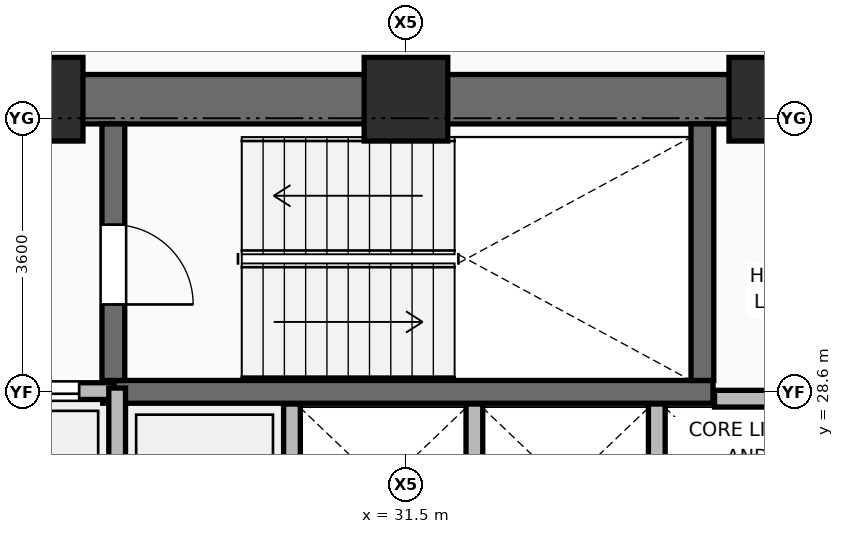
"""IFC4 building model, lengths in metres.
Left out: names, types, materials, properties, quantities, classifications, styles, units other than length and angle.
Written with IfcOpenShell. Run it as: python <this file> out.ifc"""

import sys

from ifc_helpers import new_model, si_unit, direction, frame, frame_2d, origin, origin_2d, place, context, subcontext, project, spatial, rectangle, extrude, element, fill, save


model = new_model("IFC4")
c1 = context("Model", 3, precision=1e-05, world=origin(), true_north=direction((0.0, 1.0)))
c2 = subcontext(c1, "Body", "Model", "MODEL_VIEW")
j1 = project(units=[si_unit("LENGTHUNIT", "METRE"), si_unit("PLANEANGLEUNIT", "RADIAN")], contexts=[c1])
p1 = place(None, origin())
s1 = spatial("IfcSite", under=j1, at=p1, CompositionType="ELEMENT")
p2 = place(p1, origin())
s2 = spatial("IfcBuilding", under=s1, at=p2, CompositionType="ELEMENT")
p3 = place(p2, frame((0.0, 0.0, 87.0)))
s3 = spatial("IfcBuildingStorey", under=s2, at=p3, CompositionType="ELEMENT", Elevation=87.0)
for number, where, z_axis, x_axis in (
    (1, (26.7, 32.45, 0.0), (0.0, 0.0, 1.0), (1.0, 0.0, 0.0)),
    (2, (31.5, 32.45, 0.0), (0.0, 0.0, 1.0), (1.0, 0.0, 0.0)),
    (3, (36.3, 32.45, 0.0), (0.0, 0.0, 1.0), (1.0, 0.0, 0.0)),
):
    element("IfcColumn", number, at=place(p3, frame(where, z_axis=z_axis, x_axis=x_axis)), inside=s3, PredefinedType="COLUMN", context=c2, shape_type="SweptSolid", body=[
        extrude(rectangle(XDim=1.1, YDim=1.1, at=origin_2d()), origin(), (0.0, 0.0, 1.0), 3.75),
    ])
p4 = place(p3, frame((30.0, 25.71, 0.0), z_axis=(0.0, 0.0, 1.0), x_axis=(0.0, 1.0, 0.0)))
e4 = element("IfcWall", 4, at=p4, inside=s3, PredefinedType="PARTITIONING", context=c2, shape_type="SweptSolid", body=[
    extrude(rectangle(XDim=2.73, YDim=0.22, at=frame_2d((1.365, 0.0))), origin(), (0.0, 0.0, 1.0), 3.475),
])
p5 = place(p3, frame((32.4, 26.2, 0.0), z_axis=(0.0, 0.0, 1.0), x_axis=(0.0, 1.0, 0.0)))
e5 = element("IfcWall", 5, at=p5, inside=s3, PredefinedType="PARTITIONING", context=c2, shape_type="SweptSolid", body=[
    extrude(rectangle(XDim=2.24, YDim=0.22, at=frame_2d((1.12, 0.0))), origin(), (0.0, 0.0, 1.0), 3.475),
])
p6 = place(p3, frame((34.8, 26.23, 0.0), z_axis=(0.0, 0.0, 1.0), x_axis=(0.0, 1.0, 0.0)))
e6 = element("IfcWall", 6, at=p6, inside=s3, PredefinedType="PARTITIONING", context=c2, shape_type="SweptSolid", body=[
    extrude(rectangle(XDim=2.21, YDim=0.22, at=frame_2d((1.105, 0.0))), origin(), (0.0, 0.0, 1.0), 3.475),
])
p7 = place(p3, frame((21.575, 32.45, 0.0), z_axis=(0.0, 0.0, 1.0), x_axis=(1.0, 0.0, 0.0)))
e7 = element("IfcWall", 7, at=p7, inside=s3, PredefinedType="SHEAR", context=c2, shape_type="SweptSolid", body=[
    extrude(rectangle(XDim=19.85, YDim=0.65, at=frame_2d((9.925, 0.0))), origin(), (0.0, 0.0, 1.0), 3.5),
])
p8 = place(p7, frame((2.175, 0.0, 0.0)))
e8 = element("IfcOpeningElement", 8, at=p8, cuts=e7, PredefinedType="OPENING", context=c2, shape_type="SweptSolid", body=[
    extrude(rectangle(XDim=1.1, YDim=2.1, at=frame_2d((0.55, 1.05))), frame((0.0, 0.335, 0.0), z_axis=(0.0, -1.0, 0.0), x_axis=(1.0, 0.0, 0.0)), (0.0, 0.0, 1.0), 0.67),
])
p9 = place(p7, frame((15.565, 0.0, 0.0)))
e9 = element("IfcOpeningElement", 9, at=p9, cuts=e7, PredefinedType="OPENING", context=c2, shape_type="SweptSolid", body=[
    extrude(rectangle(XDim=1.0, YDim=2.1, at=frame_2d((0.5, 1.05))), frame((0.0, 0.335, 0.0), z_axis=(0.0, -1.0, 0.0), x_axis=(1.0, 0.0, 0.0)), (0.0, 0.0, 1.0), 0.67),
])
p10 = place(p7, frame((17.575, 0.0, 0.0)))
e10 = element("IfcOpeningElement", 10, at=p10, cuts=e7, PredefinedType="OPENING", context=c2, shape_type="SweptSolid", body=[
    extrude(rectangle(XDim=0.9, YDim=2.1, at=frame_2d((0.45, 1.05))), frame((0.0, 0.335, 0.0), z_axis=(0.0, -1.0, 0.0), x_axis=(1.0, 0.0, 0.0)), (0.0, 0.0, 1.0), 0.67),
])
p11 = place(p3, frame((27.51, 28.6, 0.0), z_axis=(0.0, 0.0, 1.0), x_axis=(1.0, 0.0, 0.0)))
e11 = element("IfcWall", 11, at=p11, inside=s3, PredefinedType="SHEAR", context=c2, shape_type="SweptSolid", body=[
    extrude(rectangle(XDim=8.03, YDim=0.3, at=frame_2d((4.015, 0.0))), origin(), (0.0, 0.0, 1.0), 3.5),
])
p12 = place(p3, frame((27.65, 28.75, 0.0), z_axis=(0.0, 0.0, 1.0), x_axis=(0.0, 1.0, 0.0)))
e12 = element("IfcWall", 12, at=p12, inside=s3, PredefinedType="SHEAR", context=c2, shape_type="SweptSolid", body=[
    extrude(rectangle(XDim=3.375, YDim=0.3, at=frame_2d((1.688, 0.0))), origin(), (0.0, 0.0, 1.0), 3.5),
])
p13 = place(p12, frame((1.0, 0.0, 0.0)))
e13 = element("IfcOpeningElement", 13, at=p13, cuts=e12, PredefinedType="OPENING", context=c2, shape_type="SweptSolid", body=[
    extrude(rectangle(XDim=1.05, YDim=2.1, at=frame_2d((0.525, 1.05))), frame((0.0, 0.16, 0.0), z_axis=(0.0, -1.0, 0.0), x_axis=(1.0, 0.0, 0.0)), (0.0, 0.0, 1.0), 0.32),
])
p14 = place(p3, frame((35.4, 28.75, 0.0), z_axis=(0.0, 0.0, 1.0), x_axis=(0.0, 1.0, 0.0)))
e14 = element("IfcWall", 14, at=p14, inside=s3, PredefinedType="SHEAR", context=c2, shape_type="SweptSolid", body=[
    extrude(rectangle(XDim=3.375, YDim=0.3, at=frame_2d((1.688, 0.0))), origin(), (0.0, 0.0, 1.0), 3.5),
])
p15 = place(p3, frame((25.64, 28.61, 0.0), z_axis=(0.0, 0.0, 1.0), x_axis=(1.0, 0.0, 0.0)))
e15 = element("IfcWall", 15, at=p15, inside=s3, PredefinedType="PARTITIONING", context=c2, shape_type="SweptSolid", body=[
    extrude(rectangle(XDim=2.02, YDim=0.22, at=frame_2d((1.01, 0.0))), origin(), (0.0, 0.0, 1.0), 3.48),
])
p16 = place(p15, frame((0.46, 0.0, 0.0)))
e16 = element("IfcOpeningElement", 16, at=p16, cuts=e15, PredefinedType="OPENING", context=c2, shape_type="SweptSolid", body=[
    extrude(rectangle(XDim=1.1, YDim=2.2, at=frame_2d((0.55, 1.1))), frame((0.0, 0.12, 0.0), z_axis=(0.0, -1.0, 0.0), x_axis=(1.0, 0.0, 0.0)), (0.0, 0.0, 1.0), 0.24),
])
p17 = place(p3, frame((35.56, 28.51, 0.0), z_axis=(0.0, 0.0, 1.0), x_axis=(1.0, 0.0, 0.0)))
e17 = element("IfcWall", 17, at=p17, inside=s3, PredefinedType="PARTITIONING", context=c2, shape_type="SweptSolid", body=[
    extrude(rectangle(XDim=1.6, YDim=0.22, at=frame_2d((0.8, 0.0))), origin(), (0.0, 0.0, 1.0), 3.48),
])
p18 = place(p3, frame((27.7, 25.65, 0.0), z_axis=(0.0, 0.0, 1.0), x_axis=(0.0, 1.0, 0.0)))
e18 = element("IfcWall", 18, at=p18, inside=s3, PredefinedType="PARTITIONING", context=c2, shape_type="SweptSolid", body=[
    extrude(rectangle(XDim=3.0, YDim=0.22, at=frame_2d((1.5, 0.0))), origin(), (0.0, 0.0, 1.0), 3.48),
])
p19 = place(p13, frame((1.05, 0.0, 0.0), z_axis=(0.0, 0.0, 1.0), x_axis=(-1.0, 0.0, 0.0)))
e19 = element("IfcDoor", 19, at=p19, inside=s3, OperationType="SINGLE_SWING_RIGHT", PredefinedType="DOOR", context=c2, shape_type="SweptSolid", body=[
    extrude(rectangle(XDim=1.05, YDim=2.1, at=frame_2d((0.525, 1.05))), frame((0.0, 0.025, 0.0), z_axis=(0.0, -1.0, 0.0), x_axis=(1.0, 0.0, 0.0)), (0.0, 0.0, 1.0), 0.05),
])
fill(e13, e19)
p20 = place(p16, origin())
e20 = element("IfcDoor", 20, at=p20, inside=s3, OperationType="DOUBLE_DOOR_SLIDING", PredefinedType="DOOR", context=c2, shape_type="SweptSolid", body=[
    extrude(rectangle(XDim=1.1, YDim=2.2, at=frame_2d((0.55, 1.1))), frame((0.0, 0.025, 0.0), z_axis=(0.0, -1.0, 0.0), x_axis=(1.0, 0.0, 0.0)), (0.0, 0.0, 1.0), 0.05),
])
fill(e16, e20)
save(model, sys.argv[1])
